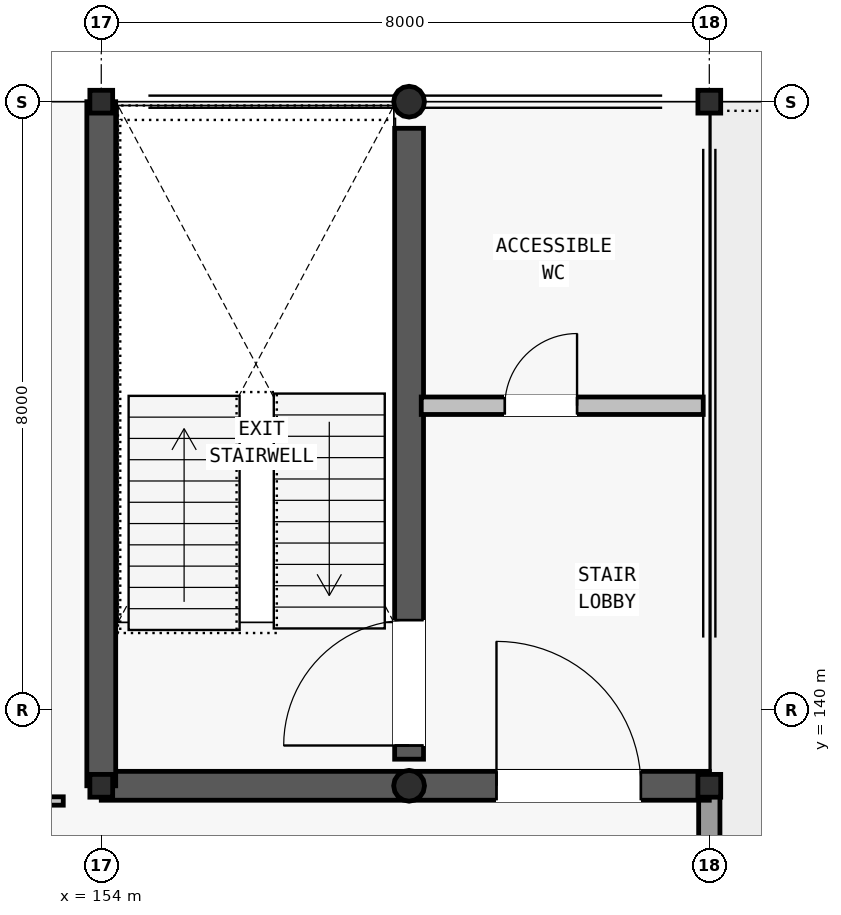
"""IFC4 building model, lengths in metres.
Left out: names, types, materials, properties, quantities, classifications, styles, units other than length and angle.
Written with IfcOpenShell. Run it as: python <this file> out.ifc"""

import sys

from ifc_helpers import new_model, si_unit, direction, frame, frame_2d, origin, origin_2d, place, context, subcontext, project, spatial, rectangle, hollow_circle, i_section, extrude, element, fill, save


model = new_model("IFC4")
c1 = context("Model", 3, precision=1e-05, world=origin(), true_north=direction((0.0, 1.0)))
c2 = subcontext(c1, "Body", "Model", "MODEL_VIEW")
j1 = project(units=[si_unit("LENGTHUNIT", "METRE"), si_unit("PLANEANGLEUNIT", "RADIAN")], contexts=[c1])
p1 = place(None, origin())
s1 = spatial("IfcSite", under=j1, at=p1, CompositionType="ELEMENT")
p2 = place(p1, origin())
s2 = spatial("IfcBuilding", under=s1, at=p2, CompositionType="ELEMENT")
p3 = place(p2, frame((0.0, 0.0, 21.2)))
s3 = spatial("IfcBuildingStorey", under=s2, at=p3, CompositionType="ELEMENT", Elevation=21.2)
for number, where, z_axis, x_axis in (
    (1, (154.0, 148.0, 0.0), (0.0, 0.0, 1.0), (1.0, 0.0, 0.0)),
    (2, (162.0, 148.0, 0.0), (0.0, 0.0, 1.0), (1.0, 0.0, 0.0)),
    (3, (154.0, 139.0, 0.0), (0.0, 0.0, 1.0), (1.0, 0.0, 0.0)),
    (4, (162.0, 139.0, 0.0), (0.0, 0.0, 1.0), (1.0, 0.0, 0.0)),
):
    element("IfcColumn", number, at=place(p3, frame(where, z_axis=z_axis, x_axis=x_axis)), inside=s3, PredefinedType="COLUMN", context=c2, shape_type="SweptSolid", body=[
        extrude(i_section(OverallWidth=0.3, OverallDepth=0.3, WebThickness=0.01, FlangeThickness=0.015, FilletRadius=0.018, at=origin_2d()), origin(), (0.0, 0.0, 1.0), 3.9),
    ])
for number, where, z_axis, x_axis in (
    (5, (158.05, 139.0, 0.0), (0.0, 0.0, 1.0), (1.0, 0.0, 0.0)),
    (6, (158.05, 148.0, 0.0), (0.0, 0.0, 1.0), (1.0, 0.0, 0.0)),
):
    element("IfcColumn", number, at=place(p3, frame(where, z_axis=z_axis, x_axis=x_axis)), inside=s3, PredefinedType="COLUMN", context=c2, shape_type="SweptSolid", body=[
        extrude(hollow_circle(Radius=0.203, WallThickness=0.014, at=origin_2d()), origin(), (0.0, 0.0, 1.0), 3.9),
    ])
p4 = place(p3, frame((162.0, 131.285, 0.0), z_axis=(0.0, 0.0, 1.0), x_axis=(0.0, 1.0, 0.0)))
e7 = element("IfcWall", 7, at=p4, inside=s3, PredefinedType="STANDARD", context=c2, shape_type="SweptSolid", body=[
    extrude(rectangle(XDim=7.575, YDim=0.28, at=frame_2d((3.788, 0.0))), origin(), (0.0, 0.0, 1.0), 2.48),
])
p5 = place(p4, frame((2.515, 0.0, 0.0)))
e8 = element("IfcOpeningElement", 8, at=p5, cuts=e7, PredefinedType="OPENING", context=c2, shape_type="SweptSolid", body=[
    extrude(rectangle(XDim=1.7, YDim=2.2, at=frame_2d((0.85, 1.1))), frame((0.0, 0.15, 0.0), z_axis=(0.0, -1.0, 0.0), x_axis=(1.0, 0.0, 0.0)), (0.0, 0.0, 1.0), 0.3),
])
p6 = place(p3, frame((154.0, 139.0, 0.0), z_axis=(0.0, 0.0, 1.0), x_axis=(1.0, 0.0, 0.0)))
e9 = element("IfcWall", 9, at=p6, inside=s3, PredefinedType="SHEAR", context=c2, shape_type="SweptSolid", body=[
    extrude(rectangle(XDim=8.0, YDim=0.38, at=frame_2d((4.0, 0.0))), origin(), (0.0, 0.0, 1.0), 3.62),
])
p7 = place(p6, frame((5.2, 0.0, 0.0)))
e10 = element("IfcOpeningElement", 10, at=p7, cuts=e9, PredefinedType="OPENING", context=c2, shape_type="SweptSolid", body=[
    extrude(rectangle(XDim=1.9, YDim=2.3, at=frame_2d((0.95, 1.15))), frame((0.0, 0.2, 0.0), z_axis=(0.0, -1.0, 0.0), x_axis=(1.0, 0.0, 0.0)), (0.0, 0.0, 1.0), 0.4),
])
p8 = place(p3, frame((154.0, 148.0, 0.0), z_axis=(0.0, 0.0, 1.0), x_axis=(0.0, -1.0, 0.0)))
e11 = element("IfcWall", 11, at=p8, inside=s3, PredefinedType="SHEAR", context=c2, shape_type="SweptSolid", body=[
    extrude(rectangle(XDim=9.0, YDim=0.38, at=frame_2d((4.5, 0.0))), origin(), (0.0, 0.0, 1.0), 3.62),
])
p9 = place(p3, frame((158.05, 139.35, 0.0), z_axis=(0.0, 0.0, 1.0), x_axis=(0.0, 1.0, 0.0)))
e12 = element("IfcWall", 12, at=p9, inside=s3, PredefinedType="SHEAR", context=c2, shape_type="SweptSolid", body=[
    extrude(rectangle(XDim=8.3, YDim=0.38, at=frame_2d((4.15, 0.0))), origin(), (0.0, 0.0, 1.0), 3.62),
])
p10 = place(p9, frame((0.18, 0.0, 0.0)))
e13 = element("IfcOpeningElement", 13, at=p10, cuts=e12, PredefinedType="OPENING", context=c2, shape_type="SweptSolid", body=[
    extrude(rectangle(XDim=1.65, YDim=2.2, at=frame_2d((0.825, 1.1))), frame((0.0, 0.2, 0.0), z_axis=(0.0, -1.0, 0.0), x_axis=(1.0, 0.0, 0.0)), (0.0, 0.0, 1.0), 0.4),
])
p11 = place(p3, frame((158.21, 144.0, 0.0), z_axis=(0.0, 0.0, 1.0), x_axis=(1.0, 0.0, 0.0)))
e14 = element("IfcWall", 14, at=p11, inside=s3, PredefinedType="PARTITIONING", context=c2, shape_type="SweptSolid", body=[
    extrude(rectangle(XDim=3.71, YDim=0.23, at=frame_2d((1.855, 0.0))), origin(), (0.0, 0.0, 1.0), 2.48),
])
p12 = place(p11, frame((1.1, 0.0, 0.0)))
e15 = element("IfcOpeningElement", 15, at=p12, cuts=e14, PredefinedType="OPENING", context=c2, shape_type="SweptSolid", body=[
    extrude(rectangle(XDim=0.95, YDim=2.1, at=frame_2d((0.475, 1.05))), frame((0.0, 0.125, 0.0), z_axis=(0.0, -1.0, 0.0), x_axis=(1.0, 0.0, 0.0)), (0.0, 0.0, 1.0), 0.25),
])
p13 = place(p3, frame((96.5, 138.8, 0.0), z_axis=(0.0, 0.0, 1.0), x_axis=(1.0, 0.0, 0.0)))
e16 = element("IfcWall", 16, at=p13, inside=s3, PredefinedType="PARTITIONING", context=c2, shape_type="SweptSolid", body=[
    extrude(rectangle(XDim=57.0, YDim=0.11, at=frame_2d((28.5, 0.0))), origin(), (0.0, 0.0, 1.0), 2.48),
])
p14 = place(p13, frame((16.5, 0.0, 0.0)))
e17 = element("IfcOpeningElement", 17, at=p14, cuts=e16, PredefinedType="OPENING", context=c2, shape_type="SweptSolid", body=[
    extrude(rectangle(XDim=1.55, YDim=2.2, at=frame_2d((0.775, 1.1))), frame((0.0, 0.065, 0.0), z_axis=(0.0, -1.0, 0.0), x_axis=(1.0, 0.0, 0.0)), (0.0, 0.0, 1.0), 0.13),
])
p15 = place(p7, origin())
e18 = element("IfcDoor", 18, at=p15, inside=s3, OperationType="SINGLE_SWING_LEFT", PredefinedType="DOOR", context=c2, shape_type="SweptSolid", body=[
    extrude(rectangle(XDim=1.9, YDim=2.3, at=frame_2d((0.95, 1.15))), frame((0.0, 0.025, 0.0), z_axis=(0.0, -1.0, 0.0), x_axis=(1.0, 0.0, 0.0)), (0.0, 0.0, 1.0), 0.05),
])
fill(e10, e18)
p16 = place(p10, origin())
e19 = element("IfcDoor", 19, at=p16, inside=s3, OperationType="SINGLE_SWING_LEFT", PredefinedType="DOOR", context=c2, shape_type="SweptSolid", body=[
    extrude(rectangle(XDim=1.65, YDim=2.2, at=frame_2d((0.825, 1.1))), frame((0.0, 0.025, 0.0), z_axis=(0.0, -1.0, 0.0), x_axis=(1.0, 0.0, 0.0)), (0.0, 0.0, 1.0), 0.05),
])
fill(e13, e19)
p17 = place(p12, origin())
e20 = element("IfcDoor", 20, at=p17, inside=s3, OperationType="SINGLE_SWING_RIGHT", PredefinedType="DOOR", context=c2, shape_type="SweptSolid", body=[
    extrude(rectangle(XDim=0.95, YDim=2.1, at=frame_2d((0.475, 1.05))), frame((0.0, 0.025, 0.0), z_axis=(0.0, -1.0, 0.0), x_axis=(1.0, 0.0, 0.0)), (0.0, 0.0, 1.0), 0.05),
])
fill(e15, e20)
save(model, sys.argv[1])
